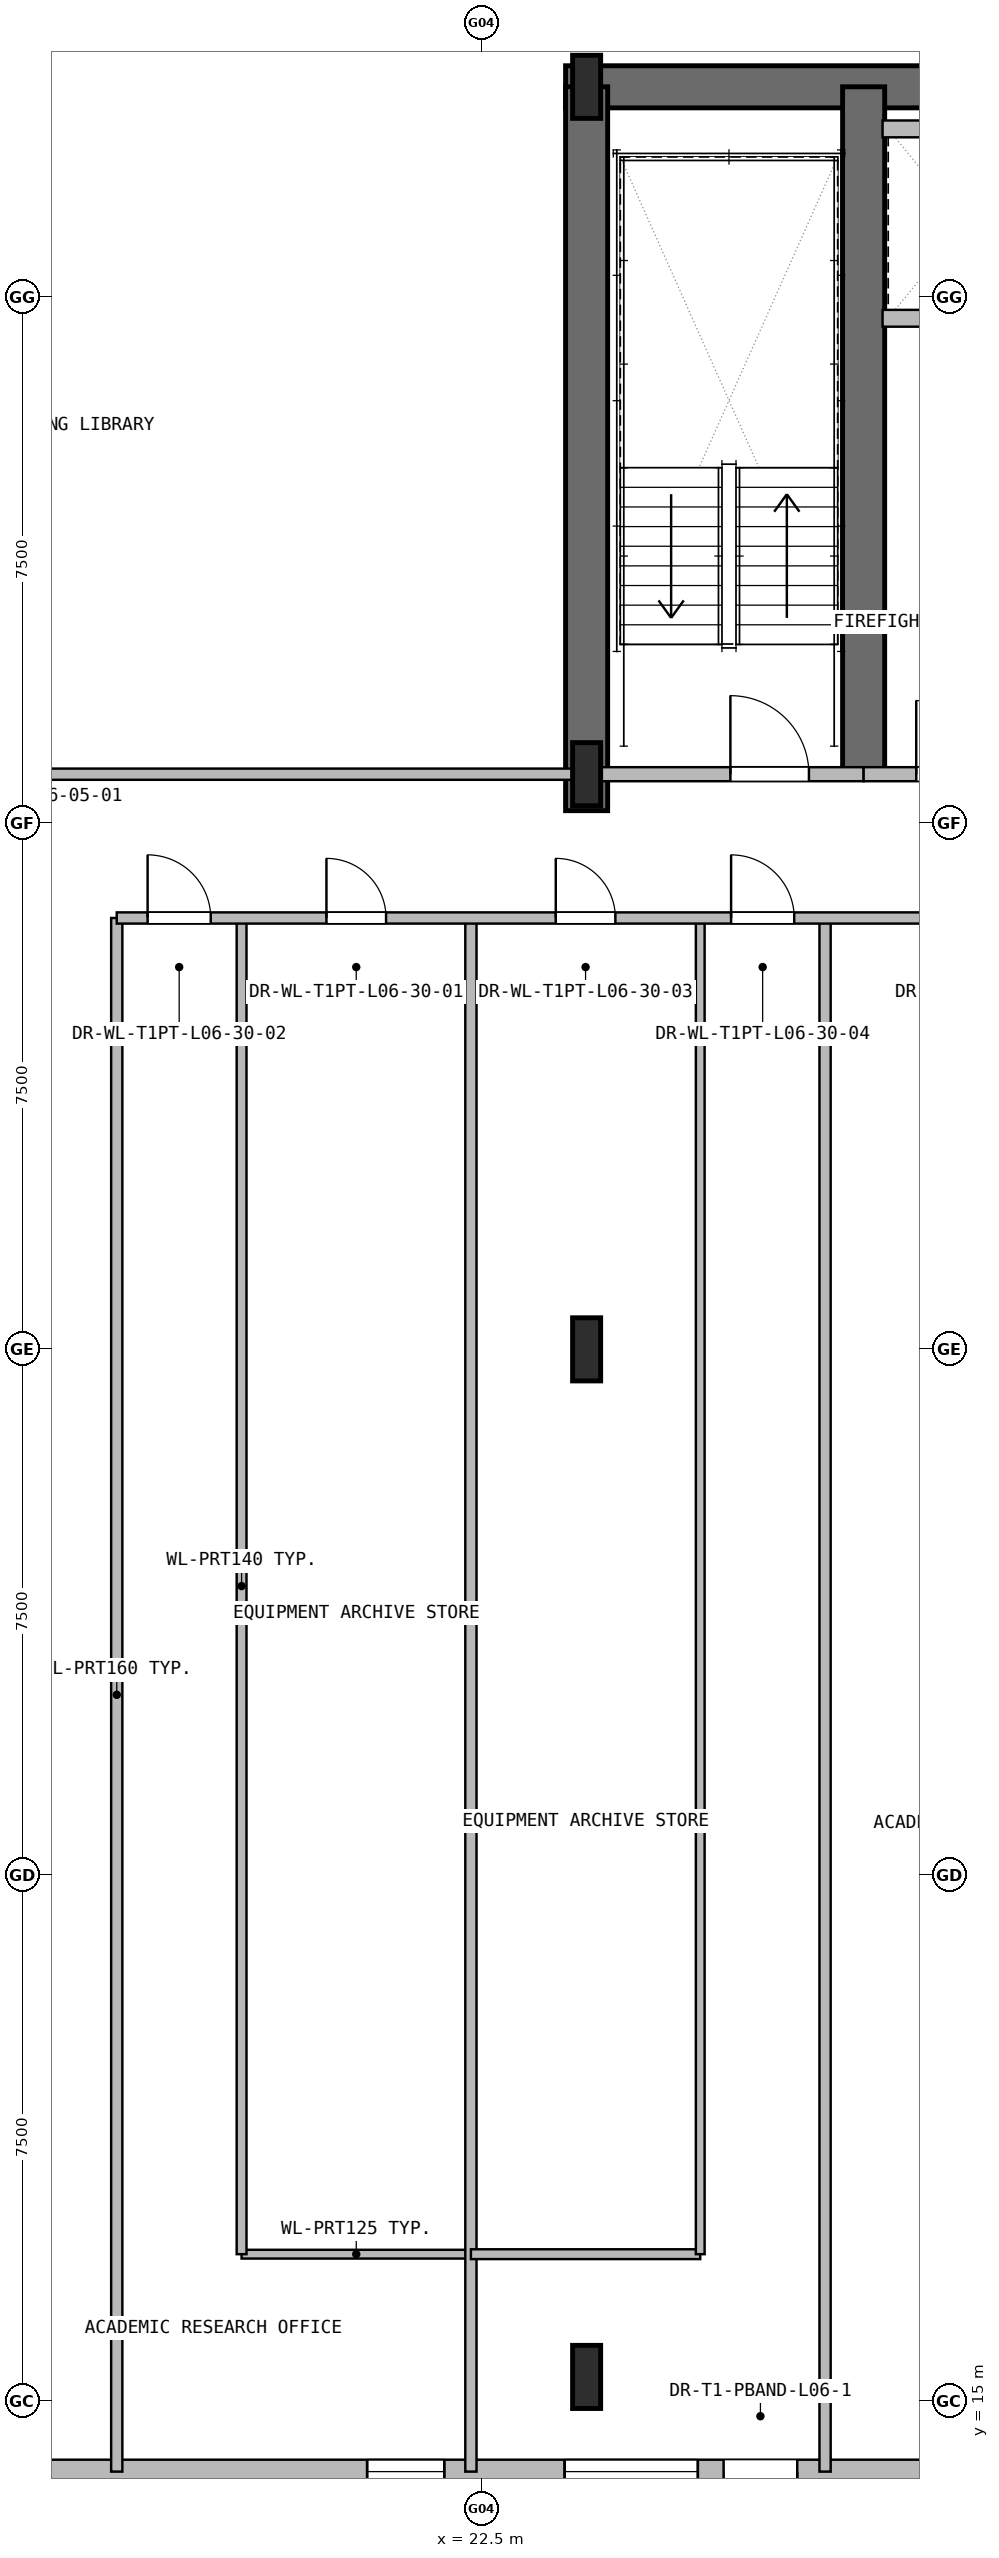
"""IFC4 building model, lengths in metres.
Left out: names, types, materials, properties, quantities, classifications, styles, units other than length and angle.
Written with IfcOpenShell. Run it as: python <this file> out.ifc"""

import sys

from ifc_helpers import new_model, si_unit, direction, frame, frame_2d, origin, origin_2d, place, context, subcontext, project, spatial, rectangle, i_section, extrude, element, fill, save


model = new_model("IFC4")
c1 = context("Model", 3, precision=1e-05, world=origin(), true_north=direction((0.0, 1.0)))
c2 = subcontext(c1, "Body", "Model", "MODEL_VIEW")
j1 = project(units=[si_unit("LENGTHUNIT", "METRE"), si_unit("PLANEANGLEUNIT", "RADIAN")], contexts=[c1])
p1 = place(None, origin())
s1 = spatial("IfcSite", under=j1, at=p1, CompositionType="ELEMENT")
p2 = place(p1, origin())
s2 = spatial("IfcBuilding", under=s1, at=p2, CompositionType="ELEMENT")
p3 = place(p2, frame((0.0, 0.0, 30.6)))
s3 = spatial("IfcBuildingStorey", under=s2, at=p3, CompositionType="ELEMENT", Elevation=30.6)
p4 = place(p3, frame((23.7, 48.0, 0.0), z_axis=(0.0, 0.0, 1.0), x_axis=(1.0, 0.0, 0.0)))
e1 = element("IfcWall", 1, at=p4, inside=s3, PredefinedType="SHEAR", context=c2, shape_type="SweptSolid", body=[
    extrude(rectangle(XDim=27.6, YDim=0.6, at=frame_2d((13.8, 0.0))), origin(), (0.0, 0.0, 1.0), 3.3),
])
p5 = place(p3, frame((24.0, 37.68, 0.0), z_axis=(0.0, 0.0, 1.0), x_axis=(0.0, 1.0, 0.0)))
e2 = element("IfcWall", 2, at=p5, inside=s3, PredefinedType="SHEAR", context=c2, shape_type="SweptSolid", body=[
    extrude(rectangle(XDim=10.32, YDim=0.6, at=frame_2d((5.16, 0.0))), origin(), (0.0, 0.0, 1.0), 3.3),
])
p6 = place(p3, frame((27.95, 38.2, 0.0), z_axis=(0.0, 0.0, 1.0), x_axis=(0.0, 1.0, 0.0)))
e3 = element("IfcWall", 3, at=p6, inside=s3, PredefinedType="SHEAR", context=c2, shape_type="SweptSolid", body=[
    extrude(rectangle(XDim=9.8, YDim=0.6, at=frame_2d((4.9, 0.0))), origin(), (0.0, 0.0, 1.0), 3.3),
])
for number, where, z_axis, x_axis in (
    (4, (24.0, 15.35, 0.0), (0.0, 0.0, 1.0), (1.0, 0.0, 0.0)),
    (5, (24.0, 30.0, 0.0), (0.0, 0.0, 1.0), (1.0, 0.0, 0.0)),
    (6, (24.0, 38.2, 0.0), (0.0, 0.0, 1.0), (1.0, 0.0, 0.0)),
    (7, (24.0, 48.0, 0.0), (0.0, 0.0, 1.0), (1.0, 0.0, 0.0)),
):
    element("IfcColumn", number, at=place(p3, frame(where, z_axis=z_axis, x_axis=x_axis)), inside=s3, PredefinedType="COLUMN", context=c2, shape_type="SweptSolid", body=[
        extrude(i_section(OverallWidth=0.4, OverallDepth=0.9, WebThickness=0.02, FlangeThickness=0.036, at=origin_2d()), origin(), (0.0, 0.0, 1.0), 3.3),
    ])
p7 = place(p3, frame((62.2, 14.0, 0.0), z_axis=(0.0, 0.0, 1.0), x_axis=(-1.0, 0.0, 0.0)))
e8 = element("IfcWall", 8, at=p7, inside=s3, PredefinedType="SOLIDWALL", context=c2, shape_type="SweptSolid", body=[
    extrude(rectangle(XDim=49.4, YDim=0.34, at=frame_2d((24.7, 0.0))), origin(), (0.0, 0.0, 1.0), 3.03),
])
p8 = place(p7, frame((35.197, 0.0, 0.0)))
e9 = element("IfcOpeningElement", 9, at=p8, cuts=e8, PredefinedType="OPENING", context=c2, shape_type="SweptSolid", body=[
    extrude(rectangle(XDim=1.05, YDim=2.1, at=frame_2d((0.525, 1.05))), frame((0.0, 0.18, 0.0), z_axis=(0.0, -1.0, 0.0), x_axis=(1.0, 0.0, 0.0)), (0.0, 0.0, 1.0), 0.36),
])
p9 = place(p7, frame((40.23, 0.0, 0.8)))
e10 = element("IfcOpeningElement", 10, at=p9, cuts=e8, PredefinedType="OPENING", context=c2, shape_type="SweptSolid", body=[
    extrude(rectangle(XDim=1.1, YDim=1.5, at=frame_2d((0.55, 0.75))), frame((0.0, 0.18, 0.0), z_axis=(0.0, -1.0, 0.0), x_axis=(1.0, 0.0, 0.0)), (0.0, 0.0, 1.0), 0.36),
])
p10 = place(p7, frame((36.614, 0.0, 0.8)))
e11 = element("IfcOpeningElement", 11, at=p10, cuts=e8, PredefinedType="OPENING", context=c2, shape_type="SweptSolid", body=[
    extrude(rectangle(XDim=1.9, YDim=1.85, at=frame_2d((0.95, 0.925))), frame((0.0, 0.18, 0.0), z_axis=(0.0, -1.0, 0.0), x_axis=(1.0, 0.0, 0.0)), (0.0, 0.0, 1.0), 0.36),
])
p11 = place(p7, frame((26.275, 0.0, 0.8)))
e12 = element("IfcOpeningElement", 12, at=p11, cuts=e8, PredefinedType="OPENING", context=c2, shape_type="SweptSolid", body=[
    extrude(rectangle(XDim=1.9, YDim=1.85, at=frame_2d((0.95, 0.925))), frame((0.0, 0.18, 0.0), z_axis=(0.0, -1.0, 0.0), x_axis=(1.0, 0.0, 0.0)), (0.0, 0.0, 1.0), 0.36),
])
p12 = place(p7, frame((16.175, 0.0, 0.8)))
e13 = element("IfcOpeningElement", 13, at=p12, cuts=e8, PredefinedType="OPENING", context=c2, shape_type="SweptSolid", body=[
    extrude(rectangle(XDim=1.9, YDim=1.85, at=frame_2d((0.95, 0.925))), frame((0.0, 0.18, 0.0), z_axis=(0.0, -1.0, 0.0), x_axis=(1.0, 0.0, 0.0)), (0.0, 0.0, 1.0), 0.36),
])
p13 = place(p7, frame((11.125, 0.0, 0.8)))
e14 = element("IfcOpeningElement", 14, at=p13, cuts=e8, PredefinedType="OPENING", context=c2, shape_type="SweptSolid", body=[
    extrude(rectangle(XDim=1.9, YDim=1.85, at=frame_2d((0.95, 0.925))), frame((0.0, 0.18, 0.0), z_axis=(0.0, -1.0, 0.0), x_axis=(1.0, 0.0, 0.0)), (0.0, 0.0, 1.0), 0.36),
])
p14 = place(p7, frame((8.07, 0.0, 0.8)))
e15 = element("IfcOpeningElement", 15, at=p14, cuts=e8, PredefinedType="OPENING", context=c2, shape_type="SweptSolid", body=[
    extrude(rectangle(XDim=1.1, YDim=1.5, at=frame_2d((0.55, 0.75))), frame((0.0, 0.18, 0.0), z_axis=(0.0, -1.0, 0.0), x_axis=(1.0, 0.0, 0.0)), (0.0, 0.0, 1.0), 0.36),
])
p15 = place(p3, frame((24.0, 38.2, 0.0), z_axis=(0.0, 0.0, 1.0), x_axis=(1.0, 0.0, 0.0)))
e16 = element("IfcWall", 16, at=p15, inside=s3, PredefinedType="PARTITIONING", context=c2, shape_type="SweptSolid", body=[
    extrude(rectangle(XDim=3.95, YDim=0.2, at=frame_2d((1.975, 0.0))), origin(), (0.0, 0.0, 1.0), 2.33),
])
p16 = place(p15, frame((2.05, 0.0, 0.0)))
e17 = element("IfcOpeningElement", 17, at=p16, cuts=e16, PredefinedType="OPENING", context=c2, shape_type="SweptSolid", body=[
    extrude(rectangle(XDim=1.12, YDim=2.1, at=frame_2d((0.56, 1.05))), frame((0.0, 0.11, 0.0), z_axis=(0.0, -1.0, 0.0), x_axis=(1.0, 0.0, 0.0)), (0.0, 0.0, 1.0), 0.22),
])
p17 = place(p3, frame((27.95, 38.2, 0.0), z_axis=(0.0, 0.0, 1.0), x_axis=(1.0, 0.0, 0.0)))
e18 = element("IfcWall", 18, at=p17, inside=s3, PredefinedType="PARTITIONING", context=c2, shape_type="SweptSolid", body=[
    extrude(rectangle(XDim=2.85, YDim=0.2, at=frame_2d((1.425, 0.0))), origin(), (0.0, 0.0, 1.0), 2.33),
])
p18 = place(p17, frame((0.75, 0.0, 0.0)))
e19 = element("IfcOpeningElement", 19, at=p18, cuts=e18, PredefinedType="OPENING", context=c2, shape_type="SweptSolid", body=[
    extrude(rectangle(XDim=1.05, YDim=2.1, at=frame_2d((0.525, 1.05))), frame((0.0, 0.11, 0.0), z_axis=(0.0, -1.0, 0.0), x_axis=(1.0, 0.0, 0.0)), (0.0, 0.0, 1.0), 0.22),
])
p19 = place(p3, frame((28.22, 44.7, 0.0), z_axis=(0.0, 0.0, 1.0), x_axis=(1.0, 0.0, 0.0)))
e20 = element("IfcWall", 20, at=p19, inside=s3, PredefinedType="PARTITIONING", context=c2, shape_type="SweptSolid", body=[
    extrude(rectangle(XDim=2.36, YDim=0.24, at=frame_2d((1.18, 0.0))), origin(), (0.0, 0.0, 1.0), 2.73),
])
p20 = place(p19, frame((0.705, 0.0, 0.0)))
e21 = element("IfcOpeningElement", 21, at=p20, cuts=e20, PredefinedType="OPENING", context=c2, shape_type="SweptSolid", body=[
    extrude(rectangle(XDim=0.95, YDim=2.15, at=frame_2d((0.475, 1.075))), frame((0.0, 0.13, 0.0), z_axis=(0.0, -1.0, 0.0), x_axis=(1.0, 0.0, 0.0)), (0.0, 0.0, 1.0), 0.26),
])
p21 = place(p3, frame((28.22, 47.4, 0.0), z_axis=(0.0, 0.0, 1.0), x_axis=(1.0, 0.0, 0.0)))
e22 = element("IfcWall", 22, at=p21, inside=s3, PredefinedType="PARTITIONING", context=c2, shape_type="SweptSolid", body=[
    extrude(rectangle(XDim=2.36, YDim=0.24, at=frame_2d((1.18, 0.0))), origin(), (0.0, 0.0, 1.0), 3.03),
])
p22 = place(p3, frame((17.3, 14.0, 0.0), z_axis=(0.0, 0.0, 1.0), x_axis=(0.0, 1.0, 0.0)))
e23 = element("IfcWall", 23, at=p22, inside=s3, PredefinedType="PARTITIONING", context=c2, shape_type="SweptSolid", body=[
    extrude(rectangle(XDim=22.15, YDim=0.16, at=frame_2d((11.075, 0.0))), origin(), (0.0, 0.0, 1.0), 3.03),
])
p23 = place(p3, frame((15.15, 38.2, 0.0), z_axis=(0.0, 0.0, 1.0), x_axis=(1.0, 0.0, 0.0)))
e24 = element("IfcWall", 24, at=p23, inside=s3, PredefinedType="PARTITIONING", context=c2, shape_type="SweptSolid", body=[
    extrude(rectangle(XDim=8.85, YDim=0.16, at=frame_2d((4.425, 0.0))), origin(), (0.0, 0.0, 1.0), 2.33),
])
p24 = place(p3, frame((19.08, 17.1, 0.0), z_axis=(0.0, 0.0, 1.0), x_axis=(1.0, 0.0, 0.0)))
e25 = element("IfcWall", 25, at=p24, inside=s3, PredefinedType="PARTITIONING", context=c2, shape_type="SweptSolid", body=[
    extrude(rectangle(XDim=3.27, YDim=0.125, at=frame_2d((1.635, 0.0))), origin(), (0.0, 0.0, 1.0), 3.03),
])
p25 = place(p3, frame((19.08, 17.1, 0.0), z_axis=(0.0, 0.0, 1.0), x_axis=(0.0, 1.0, 0.0)))
e26 = element("IfcWall", 26, at=p25, inside=s3, PredefinedType="PARTITIONING", context=c2, shape_type="SweptSolid", body=[
    extrude(rectangle(XDim=19.05, YDim=0.14, at=frame_2d((9.525, 0.0))), origin(), (0.0, 0.0, 1.0), 3.03),
])
p26 = place(p3, frame((22.35, 14.0, 0.0), z_axis=(0.0, 0.0, 1.0), x_axis=(0.0, 1.0, 0.0)))
e27 = element("IfcWall", 27, at=p26, inside=s3, PredefinedType="PARTITIONING", context=c2, shape_type="SweptSolid", body=[
    extrude(rectangle(XDim=22.15, YDim=0.16, at=frame_2d((11.075, 0.0))), origin(), (0.0, 0.0, 1.0), 3.03),
])
p27 = place(p3, frame((22.35, 17.1, 0.0), z_axis=(0.0, 0.0, 1.0), x_axis=(1.0, 0.0, 0.0)))
e28 = element("IfcWall", 28, at=p27, inside=s3, PredefinedType="PARTITIONING", context=c2, shape_type="SweptSolid", body=[
    extrude(rectangle(XDim=3.27, YDim=0.14, at=frame_2d((1.635, 0.0))), origin(), (0.0, 0.0, 1.0), 3.03),
])
p28 = place(p3, frame((25.62, 17.1, 0.0), z_axis=(0.0, 0.0, 1.0), x_axis=(0.0, 1.0, 0.0)))
e29 = element("IfcWall", 29, at=p28, inside=s3, PredefinedType="PARTITIONING", context=c2, shape_type="SweptSolid", body=[
    extrude(rectangle(XDim=19.05, YDim=0.125, at=frame_2d((9.525, 0.0))), origin(), (0.0, 0.0, 1.0), 3.03),
])
p29 = place(p3, frame((27.4, 14.0, 0.0), z_axis=(0.0, 0.0, 1.0), x_axis=(0.0, 1.0, 0.0)))
e30 = element("IfcWall", 30, at=p29, inside=s3, PredefinedType="PARTITIONING", context=c2, shape_type="SweptSolid", body=[
    extrude(rectangle(XDim=22.15, YDim=0.16, at=frame_2d((11.075, 0.0))), origin(), (0.0, 0.0, 1.0), 3.03),
])
p30 = place(p3, frame((17.3, 36.15, 0.0), z_axis=(0.0, 0.0, 1.0), x_axis=(1.0, 0.0, 0.0)))
e31 = element("IfcWall", 31, at=p30, inside=s3, PredefinedType="PARTITIONING", context=c2, shape_type="SweptSolid", body=[
    extrude(rectangle(XDim=40.4, YDim=0.16, at=frame_2d((20.2, 0.0))), origin(), (0.0, 0.0, 1.0), 3.03),
])
p31 = place(p30, frame((2.99, 0.0, 0.0)))
e32 = element("IfcOpeningElement", 32, at=p31, cuts=e31, PredefinedType="OPENING", context=c2, shape_type="SweptSolid", body=[
    extrude(rectangle(XDim=0.85, YDim=2.05, at=frame_2d((0.425, 1.025))), frame((0.0, 0.09, 0.0), z_axis=(0.0, -1.0, 0.0), x_axis=(1.0, 0.0, 0.0)), (0.0, 0.0, 1.0), 0.18),
])
p32 = place(p30, frame((0.44, 0.0, 0.0)))
e33 = element("IfcOpeningElement", 33, at=p32, cuts=e31, PredefinedType="OPENING", context=c2, shape_type="SweptSolid", body=[
    extrude(rectangle(XDim=0.9, YDim=2.05, at=frame_2d((0.45, 1.025))), frame((0.0, 0.09, 0.0), z_axis=(0.0, -1.0, 0.0), x_axis=(1.0, 0.0, 0.0)), (0.0, 0.0, 1.0), 0.18),
])
p33 = place(p30, frame((6.26, 0.0, 0.0)))
e34 = element("IfcOpeningElement", 34, at=p33, cuts=e31, PredefinedType="OPENING", context=c2, shape_type="SweptSolid", body=[
    extrude(rectangle(XDim=0.85, YDim=2.05, at=frame_2d((0.425, 1.025))), frame((0.0, 0.09, 0.0), z_axis=(0.0, -1.0, 0.0), x_axis=(1.0, 0.0, 0.0)), (0.0, 0.0, 1.0), 0.18),
])
p34 = place(p30, frame((8.76, 0.0, 0.0)))
e35 = element("IfcOpeningElement", 35, at=p34, cuts=e31, PredefinedType="OPENING", context=c2, shape_type="SweptSolid", body=[
    extrude(rectangle(XDim=0.9, YDim=2.05, at=frame_2d((0.45, 1.025))), frame((0.0, 0.09, 0.0), z_axis=(0.0, -1.0, 0.0), x_axis=(1.0, 0.0, 0.0)), (0.0, 0.0, 1.0), 0.18),
])
p35 = place(p30, frame((12.15, 0.0, 0.0)))
e36 = element("IfcOpeningElement", 36, at=p35, cuts=e31, PredefinedType="OPENING", context=c2, shape_type="SweptSolid", body=[
    extrude(rectangle(XDim=0.95, YDim=2.1, at=frame_2d((0.475, 1.05))), frame((0.0, 0.09, 0.0), z_axis=(0.0, -1.0, 0.0), x_axis=(1.0, 0.0, 0.0)), (0.0, 0.0, 1.0), 0.18),
])
p36 = place(p30, frame((17.225, 0.0, 0.0)))
e37 = element("IfcOpeningElement", 37, at=p36, cuts=e31, PredefinedType="OPENING", context=c2, shape_type="SweptSolid", body=[
    extrude(rectangle(XDim=0.9, YDim=2.05, at=frame_2d((0.45, 1.025))), frame((0.0, 0.09, 0.0), z_axis=(0.0, -1.0, 0.0), x_axis=(1.0, 0.0, 0.0)), (0.0, 0.0, 1.0), 0.18),
])
p37 = place(p30, frame((22.275, 0.0, 0.0)))
e38 = element("IfcOpeningElement", 38, at=p37, cuts=e31, PredefinedType="OPENING", context=c2, shape_type="SweptSolid", body=[
    extrude(rectangle(XDim=0.9, YDim=2.05, at=frame_2d((0.45, 1.025))), frame((0.0, 0.09, 0.0), z_axis=(0.0, -1.0, 0.0), x_axis=(1.0, 0.0, 0.0)), (0.0, 0.0, 1.0), 0.18),
])
p38 = place(p30, frame((26.46, 0.0, 0.0)))
e39 = element("IfcOpeningElement", 39, at=p38, cuts=e31, PredefinedType="OPENING", context=c2, shape_type="SweptSolid", body=[
    extrude(rectangle(XDim=0.85, YDim=2.05, at=frame_2d((0.425, 1.025))), frame((0.0, 0.09, 0.0), z_axis=(0.0, -1.0, 0.0), x_axis=(1.0, 0.0, 0.0)), (0.0, 0.0, 1.0), 0.18),
])
p39 = place(p30, frame((28.96, 0.0, 0.0)))
e40 = element("IfcOpeningElement", 40, at=p39, cuts=e31, PredefinedType="OPENING", context=c2, shape_type="SweptSolid", body=[
    extrude(rectangle(XDim=0.9, YDim=2.05, at=frame_2d((0.45, 1.025))), frame((0.0, 0.09, 0.0), z_axis=(0.0, -1.0, 0.0), x_axis=(1.0, 0.0, 0.0)), (0.0, 0.0, 1.0), 0.18),
])
p40 = place(p30, frame((33.29, 0.0, 0.0)))
e41 = element("IfcOpeningElement", 41, at=p40, cuts=e31, PredefinedType="OPENING", context=c2, shape_type="SweptSolid", body=[
    extrude(rectangle(XDim=0.85, YDim=2.05, at=frame_2d((0.425, 1.025))), frame((0.0, 0.09, 0.0), z_axis=(0.0, -1.0, 0.0), x_axis=(1.0, 0.0, 0.0)), (0.0, 0.0, 1.0), 0.18),
])
p41 = place(p30, frame((30.74, 0.0, 0.0)))
e42 = element("IfcOpeningElement", 42, at=p41, cuts=e31, PredefinedType="OPENING", context=c2, shape_type="SweptSolid", body=[
    extrude(rectangle(XDim=0.9, YDim=2.05, at=frame_2d((0.45, 1.025))), frame((0.0, 0.09, 0.0), z_axis=(0.0, -1.0, 0.0), x_axis=(1.0, 0.0, 0.0)), (0.0, 0.0, 1.0), 0.18),
])
p42 = place(p30, frame((36.56, 0.0, 0.0)))
e43 = element("IfcOpeningElement", 43, at=p42, cuts=e31, PredefinedType="OPENING", context=c2, shape_type="SweptSolid", body=[
    extrude(rectangle(XDim=0.85, YDim=2.05, at=frame_2d((0.425, 1.025))), frame((0.0, 0.09, 0.0), z_axis=(0.0, -1.0, 0.0), x_axis=(1.0, 0.0, 0.0)), (0.0, 0.0, 1.0), 0.18),
])
p43 = place(p30, frame((39.06, 0.0, 0.0)))
e44 = element("IfcOpeningElement", 44, at=p43, cuts=e31, PredefinedType="OPENING", context=c2, shape_type="SweptSolid", body=[
    extrude(rectangle(XDim=0.9, YDim=2.05, at=frame_2d((0.45, 1.025))), frame((0.0, 0.09, 0.0), z_axis=(0.0, -1.0, 0.0), x_axis=(1.0, 0.0, 0.0)), (0.0, 0.0, 1.0), 0.18),
])
p44 = place(p8, origin())
e45 = element("IfcDoor", 45, at=p44, inside=s3, OperationType="SINGLE_SWING_LEFT", PredefinedType="DOOR", context=c2, shape_type="SweptSolid", body=[
    extrude(rectangle(XDim=1.05, YDim=2.1, at=frame_2d((0.525, 1.05))), frame((0.0, 0.025, 0.0), z_axis=(0.0, -1.0, 0.0), x_axis=(1.0, 0.0, 0.0)), (0.0, 0.0, 1.0), 0.05),
])
fill(e9, e45)
p45 = place(p9, origin())
e46 = element("IfcWindow", 46, at=p45, inside=s3, PartitioningType="SINGLE_PANEL", PredefinedType="WINDOW", context=c2, shape_type="SweptSolid", body=[
    extrude(rectangle(XDim=1.1, YDim=1.5, at=frame_2d((0.55, 0.75))), frame((0.0, 0.03, 0.0), z_axis=(0.0, -1.0, 0.0), x_axis=(1.0, 0.0, 0.0)), (0.0, 0.0, 1.0), 0.06),
])
fill(e10, e46)
p46 = place(p10, origin())
e47 = element("IfcWindow", 47, at=p46, inside=s3, PartitioningType="SINGLE_PANEL", PredefinedType="WINDOW", context=c2, shape_type="SweptSolid", body=[
    extrude(rectangle(XDim=1.9, YDim=1.85, at=frame_2d((0.95, 0.925))), frame((0.0, 0.03, 0.0), z_axis=(0.0, -1.0, 0.0), x_axis=(1.0, 0.0, 0.0)), (0.0, 0.0, 1.0), 0.06),
])
fill(e11, e47)
p47 = place(p16, origin())
e48 = element("IfcDoor", 48, at=p47, inside=s3, OperationType="SINGLE_SWING_LEFT", PredefinedType="DOOR", context=c2, shape_type="SweptSolid", body=[
    extrude(rectangle(XDim=1.12, YDim=2.1, at=frame_2d((0.56, 1.05))), frame((0.0, 0.025, 0.0), z_axis=(0.0, -1.0, 0.0), x_axis=(1.0, 0.0, 0.0)), (0.0, 0.0, 1.0), 0.05),
])
fill(e17, e48)
p48 = place(p18, origin())
e49 = element("IfcDoor", 49, at=p48, inside=s3, OperationType="SINGLE_SWING_RIGHT", PredefinedType="DOOR", context=c2, shape_type="SweptSolid", body=[
    extrude(rectangle(XDim=1.05, YDim=2.1, at=frame_2d((0.525, 1.05))), frame((0.0, 0.025, 0.0), z_axis=(0.0, -1.0, 0.0), x_axis=(1.0, 0.0, 0.0)), (0.0, 0.0, 1.0), 0.05),
])
fill(e19, e49)
p49 = place(p31, origin())
e50 = element("IfcDoor", 50, at=p49, inside=s3, OperationType="SINGLE_SWING_RIGHT", PredefinedType="DOOR", context=c2, shape_type="SweptSolid", body=[
    extrude(rectangle(XDim=0.85, YDim=2.05, at=frame_2d((0.425, 1.025))), frame((0.0, 0.025, 0.0), z_axis=(0.0, -1.0, 0.0), x_axis=(1.0, 0.0, 0.0)), (0.0, 0.0, 1.0), 0.05),
])
fill(e32, e50)
p50 = place(p32, origin())
e51 = element("IfcDoor", 51, at=p50, inside=s3, OperationType="SINGLE_SWING_LEFT", PredefinedType="DOOR", context=c2, shape_type="SweptSolid", body=[
    extrude(rectangle(XDim=0.9, YDim=2.05, at=frame_2d((0.45, 1.025))), frame((0.0, 0.025, 0.0), z_axis=(0.0, -1.0, 0.0), x_axis=(1.0, 0.0, 0.0)), (0.0, 0.0, 1.0), 0.05),
])
fill(e33, e51)
p51 = place(p33, origin())
e52 = element("IfcDoor", 52, at=p51, inside=s3, OperationType="SINGLE_SWING_RIGHT", PredefinedType="DOOR", context=c2, shape_type="SweptSolid", body=[
    extrude(rectangle(XDim=0.85, YDim=2.05, at=frame_2d((0.425, 1.025))), frame((0.0, 0.025, 0.0), z_axis=(0.0, -1.0, 0.0), x_axis=(1.0, 0.0, 0.0)), (0.0, 0.0, 1.0), 0.05),
])
fill(e34, e52)
p52 = place(p34, origin())
e53 = element("IfcDoor", 53, at=p52, inside=s3, OperationType="SINGLE_SWING_LEFT", PredefinedType="DOOR", context=c2, shape_type="SweptSolid", body=[
    extrude(rectangle(XDim=0.9, YDim=2.05, at=frame_2d((0.45, 1.025))), frame((0.0, 0.025, 0.0), z_axis=(0.0, -1.0, 0.0), x_axis=(1.0, 0.0, 0.0)), (0.0, 0.0, 1.0), 0.05),
])
fill(e35, e53)
save(model, sys.argv[1])
